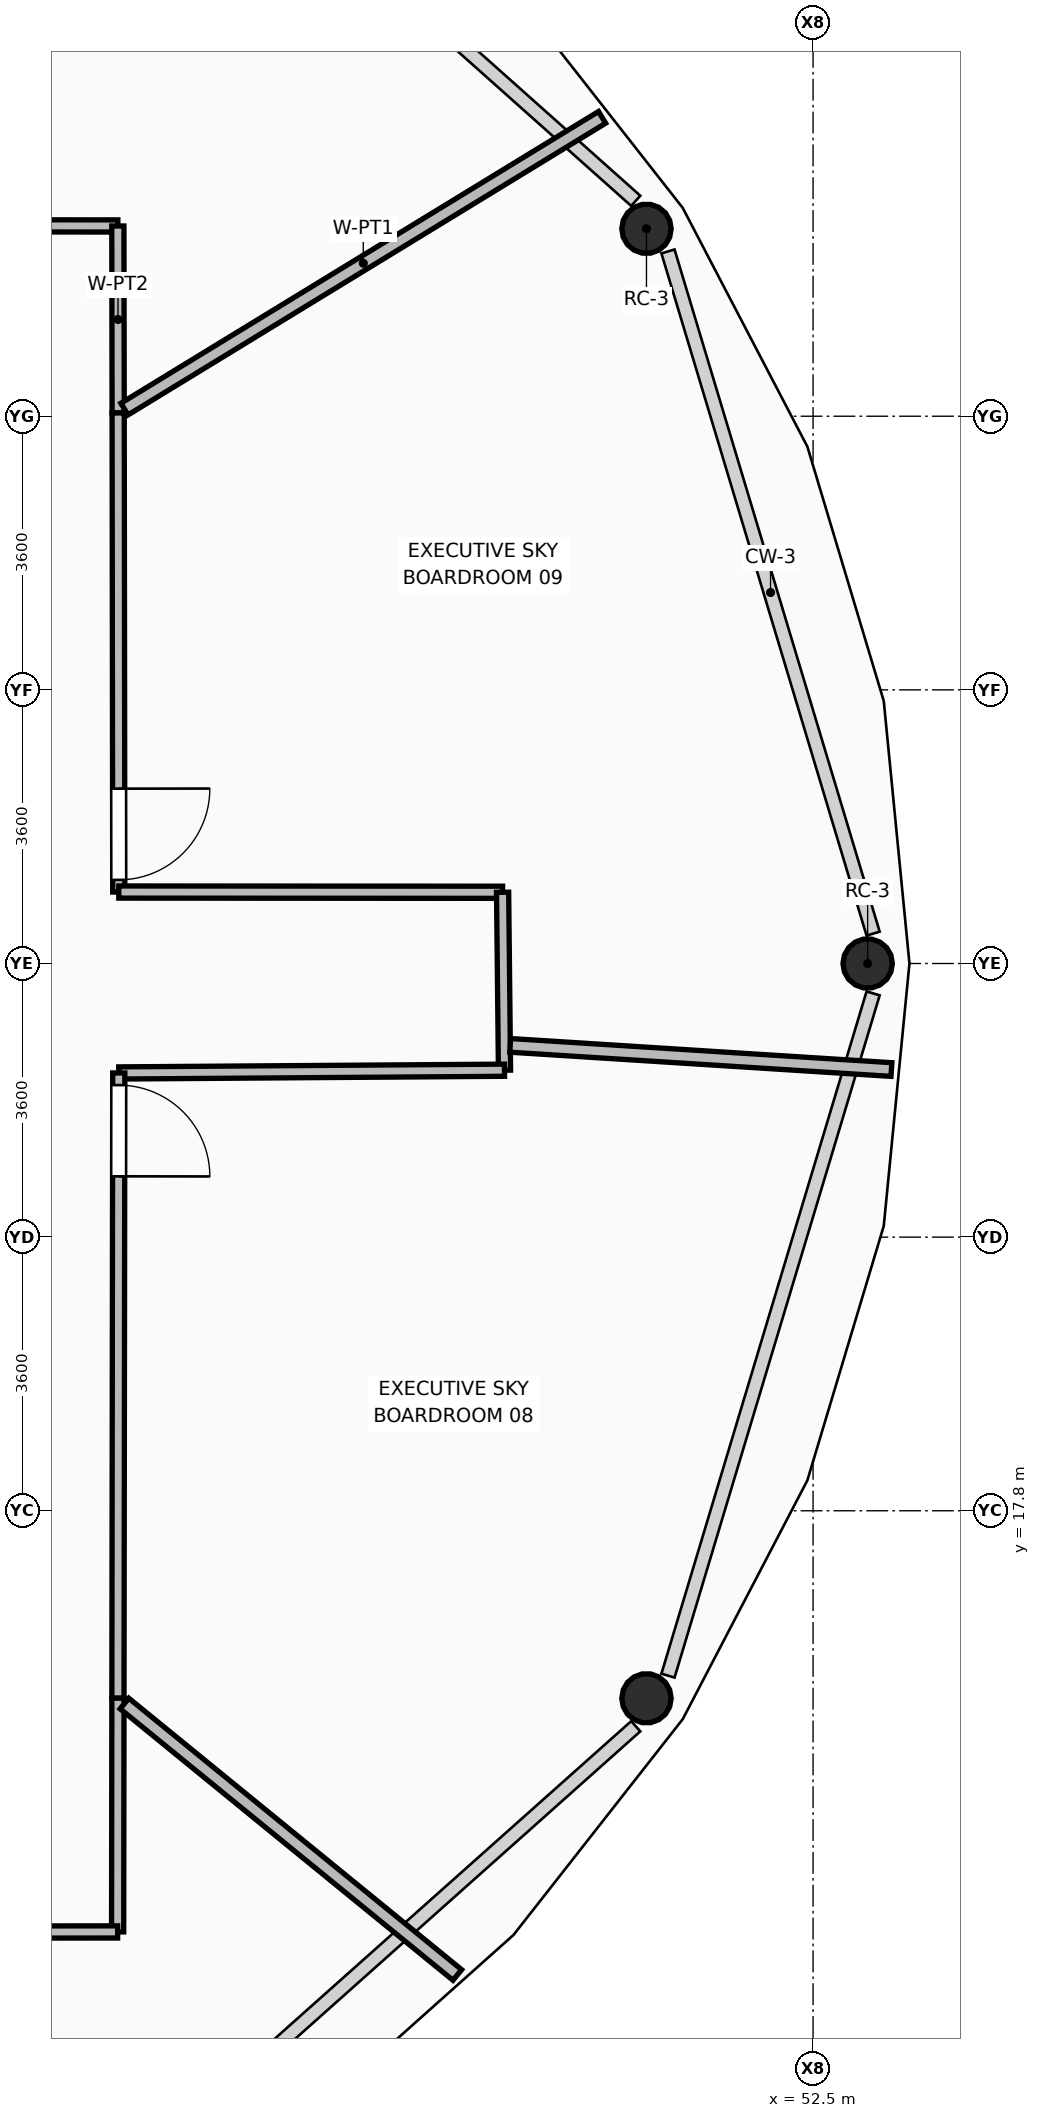
"""IFC4 building model, lengths in metres.
Left out: names, types, materials, properties, quantities, classifications, styles, units other than length and angle.
Written with IfcOpenShell. Run it as: python <this file> out.ifc"""

import sys

from ifc_helpers import new_model, si_unit, direction, frame, frame_2d, origin, origin_2d, place, context, subcontext, project, spatial, rectangle, hollow_circle, extrude, element, fill, save


model = new_model("IFC4")
c1 = context("Model", 3, precision=1e-05, world=origin(), true_north=direction((0.0, 1.0)))
c2 = subcontext(c1, "Body", "Model", "MODEL_VIEW")
j1 = project(units=[si_unit("LENGTHUNIT", "METRE"), si_unit("PLANEANGLEUNIT", "RADIAN")], contexts=[c1])
p1 = place(None, origin())
s1 = spatial("IfcSite", under=j1, at=p1, CompositionType="ELEMENT")
p2 = place(p1, origin())
s2 = spatial("IfcBuilding", under=s1, at=p2, CompositionType="ELEMENT")
p3 = place(p2, frame((0.0, 0.0, 242.4)))
s3 = spatial("IfcBuildingStorey", under=s2, at=p3, CompositionType="ELEMENT", Elevation=242.4)
for number, where, z_axis, x_axis in (
    (1, (53.218, 25.0, 0.0), (0.0, 0.0, 1.0), (1.0, 0.0, 0.0)),
    (2, (50.308, 34.666, 0.0), (0.0, 0.0, 1.0), (1.0, 0.0, 0.0)),
    (3, (50.308, 15.333, 0.0), (0.0, 0.0, 1.0), (1.0, 0.0, 0.0)),
):
    element("IfcColumn", number, at=place(p3, frame(where, z_axis=z_axis, x_axis=x_axis)), inside=s3, PredefinedType="COLUMN", context=c2, shape_type="SweptSolid", body=[
        extrude(hollow_circle(Radius=0.325, WallThickness=0.03, at=origin_2d()), origin(), (0.0, 0.0, 1.0), 3.57),
    ])
p4 = place(p3, frame((32.74, 34.715, 0.0), z_axis=(0.0, 0.0, 1.0), x_axis=(0.99999933853, -0.001150191321, 0.0)))
e4 = element("IfcWall", 4, at=p4, inside=s3, PredefinedType="PARTITIONING", context=c2, shape_type="SweptSolid", body=[
    extrude(rectangle(XDim=10.613, YDim=0.16, at=frame_2d((5.307, 0.0))), origin(), (0.0, 0.0, 1.0), 3.081),
])
p5 = place(p4, frame((2.694, 0.0, 0.0)))
e5 = element("IfcOpeningElement", 5, at=p5, cuts=e4, PredefinedType="OPENING", context=c2, shape_type="SweptSolid", body=[
    extrude(rectangle(XDim=1.2, YDim=2.1, at=frame_2d((0.6, 1.05))), frame((0.0, 0.09, 0.0), z_axis=(0.0, -1.0, 0.0), x_axis=(1.0, 0.0, 0.0)), (0.0, 0.0, 1.0), 0.18),
])
p6 = place(p3, frame((43.353, 34.703, 0.0), z_axis=(0.0, 0.0, 1.0), x_axis=(0.001587929717, -0.999998739239, 0.0)))
e6 = element("IfcWall", 6, at=p6, inside=s3, PredefinedType="PARTITIONING", context=c2, shape_type="SweptSolid", body=[
    extrude(rectangle(XDim=2.46, YDim=0.16, at=frame_2d((1.23, 0.0))), origin(), (0.0, 0.0, 1.0), 3.081),
])
p7 = place(p3, frame((43.357, 32.243, 0.0), z_axis=(0.0, 0.0, 1.0), x_axis=(0.00127822648, -0.999999183068, 0.0)))
e7 = element("IfcWall", 7, at=p7, inside=s3, PredefinedType="PARTITIONING", context=c2, shape_type="SweptSolid", body=[
    extrude(rectangle(XDim=6.303, YDim=0.16, at=frame_2d((3.151, 0.0))), origin(), (0.0, 0.0, 1.0), 3.55),
])
p8 = place(p7, frame((4.943, 0.0, 0.0)))
e8 = element("IfcOpeningElement", 8, at=p8, cuts=e7, PredefinedType="OPENING", context=c2, shape_type="SweptSolid", body=[
    extrude(rectangle(XDim=1.2, YDim=2.1, at=frame_2d((0.6, 1.05))), frame((0.0, 0.09, 0.0), z_axis=(0.0, -1.0, 0.0), x_axis=(1.0, 0.0, 0.0)), (0.0, 0.0, 1.0), 0.18),
])
p9 = place(p3, frame((43.365, 25.94, 0.0), z_axis=(0.0, 0.0, 1.0), x_axis=(0.999999831724, -0.000580130432, 0.0)))
e9 = element("IfcWall", 9, at=p9, inside=s3, PredefinedType="PARTITIONING", context=c2, shape_type="SweptSolid", body=[
    extrude(rectangle(XDim=5.05, YDim=0.16, at=frame_2d((2.525, 0.0))), origin(), (0.0, 0.0, 1.0), 3.55),
])
p10 = place(p3, frame((48.415, 25.937, 0.0), z_axis=(0.0, 0.0, 1.0), x_axis=(0.010636586698, -0.999943429912, 0.0)))
e10 = element("IfcWall", 10, at=p10, inside=s3, PredefinedType="PARTITIONING", context=c2, shape_type="SweptSolid", body=[
    extrude(rectangle(XDim=2.341, YDim=0.16, at=frame_2d((1.171, 0.0))), origin(), (0.0, 0.0, 1.0), 3.55),
])
p11 = place(p3, frame((48.44, 23.596, 0.0), z_axis=(0.0, 0.0, 1.0), x_axis=(-0.999974996273, -0.007071550702, 0.0)))
e11 = element("IfcWall", 11, at=p11, inside=s3, PredefinedType="PARTITIONING", context=c2, shape_type="SweptSolid", body=[
    extrude(rectangle(XDim=5.075, YDim=0.16, at=frame_2d((2.538, 0.0))), origin(), (0.0, 0.0, 1.0), 3.55),
])
p12 = place(p3, frame((43.365, 23.56, 0.0), z_axis=(0.0, 0.0, 1.0), x_axis=(-0.001335548165, -0.999999108155, 0.0)))
e12 = element("IfcWall", 12, at=p12, inside=s3, PredefinedType="PARTITIONING", context=c2, shape_type="SweptSolid", body=[
    extrude(rectangle(XDim=8.226, YDim=0.16, at=frame_2d((4.113, 0.0))), origin(), (0.0, 0.0, 1.0), 3.081),
])
p13 = place(p12, frame((0.16, 0.0, 0.0)))
e13 = element("IfcOpeningElement", 13, at=p13, cuts=e12, PredefinedType="OPENING", context=c2, shape_type="SweptSolid", body=[
    extrude(rectangle(XDim=1.2, YDim=2.1, at=frame_2d((0.6, 1.05))), frame((0.0, 0.09, 0.0), z_axis=(0.0, -1.0, 0.0), x_axis=(1.0, 0.0, 0.0)), (0.0, 0.0, 1.0), 0.18),
])
p14 = place(p3, frame((43.354, 15.334, 0.0), z_axis=(0.0, 0.0, 1.0), x_axis=(-0.00127034435, -0.999999193112, 0.0)))
e14 = element("IfcWall", 14, at=p14, inside=s3, PredefinedType="PARTITIONING", context=c2, shape_type="SweptSolid", body=[
    extrude(rectangle(XDim=3.075, YDim=0.16, at=frame_2d((1.538, 0.0))), origin(), (0.0, 0.0, 1.0), 3.55),
])
p15 = place(p3, frame((43.35, 12.259, 0.0), z_axis=(0.0, 0.0, 1.0), x_axis=(-0.999999637579, -0.000851376852, 0.0)))
e15 = element("IfcWall", 15, at=p15, inside=s3, PredefinedType="PARTITIONING", context=c2, shape_type="SweptSolid", body=[
    extrude(rectangle(XDim=10.61, YDim=0.16, at=frame_2d((5.305, 0.0))), origin(), (0.0, 0.0, 1.0), 3.081),
])
p16 = place(p15, frame((5.972, 0.0, 0.0)))
e16 = element("IfcOpeningElement", 16, at=p16, cuts=e15, PredefinedType="OPENING", context=c2, shape_type="SweptSolid", body=[
    extrude(rectangle(XDim=1.2, YDim=2.1, at=frame_2d((0.6, 1.05))), frame((0.0, 0.09, 0.0), z_axis=(0.0, -1.0, 0.0), x_axis=(1.0, 0.0, 0.0)), (0.0, 0.0, 1.0), 0.18),
])
p17 = place(p3, frame((43.44, 32.294, 0.0), z_axis=(0.0, 0.0, 1.0), x_axis=(0.853414575763, 0.521232732928, 0.0)))
e17 = element("IfcWall", 17, at=p17, inside=s3, PredefinedType="PARTITIONING", context=c2, shape_type="SweptSolid", body=[
    extrude(rectangle(XDim=7.364, YDim=0.18, at=frame_2d((3.682, 0.0))), origin(), (0.0, 0.0, 1.0), 2.925),
])
p18 = place(p3, frame((43.44, 15.264, 0.0), z_axis=(0.0, 0.0, 1.0), x_axis=(0.77500924649, -0.631949893469, 0.0)))
e18 = element("IfcWall", 18, at=p18, inside=s3, PredefinedType="PARTITIONING", context=c2, shape_type="SweptSolid", body=[
    extrude(rectangle(XDim=5.65, YDim=0.18, at=frame_2d((2.825, 0.0))), origin(), (0.0, 0.0, 1.0), 2.925),
])
p19 = place(p3, frame((48.515, 23.923, 0.0), z_axis=(0.0, 0.0, 1.0), x_axis=(0.997995081833, -0.063291521057, 0.0)))
e19 = element("IfcWall", 19, at=p19, inside=s3, PredefinedType="PARTITIONING", context=c2, shape_type="SweptSolid", body=[
    extrude(rectangle(XDim=5.026, YDim=0.18, at=frame_2d((2.513, 0.0))), origin(), (0.0, 0.0, 1.0), 2.925),
])
p20 = place(p13, origin())
e20 = element("IfcDoor", 20, at=p20, inside=s3, OperationType="SINGLE_SWING_RIGHT", PredefinedType="DOOR", context=c2, shape_type="SweptSolid", body=[
    extrude(rectangle(XDim=1.2, YDim=2.1, at=frame_2d((0.6, 1.05))), frame((0.0, 0.025, 0.0), z_axis=(0.0, -1.0, 0.0), x_axis=(1.0, 0.0, 0.0)), (0.0, 0.0, 1.0), 0.05),
])
fill(e13, e20)
p21 = place(p8, origin())
e21 = element("IfcDoor", 21, at=p21, inside=s3, OperationType="SINGLE_SWING_LEFT", PredefinedType="DOOR", context=c2, shape_type="SweptSolid", body=[
    extrude(rectangle(XDim=1.2, YDim=2.1, at=frame_2d((0.6, 1.05))), frame((0.0, 0.025, 0.0), z_axis=(0.0, -1.0, 0.0), x_axis=(1.0, 0.0, 0.0)), (0.0, 0.0, 1.0), 0.05),
])
fill(e8, e21)
save(model, sys.argv[1])
